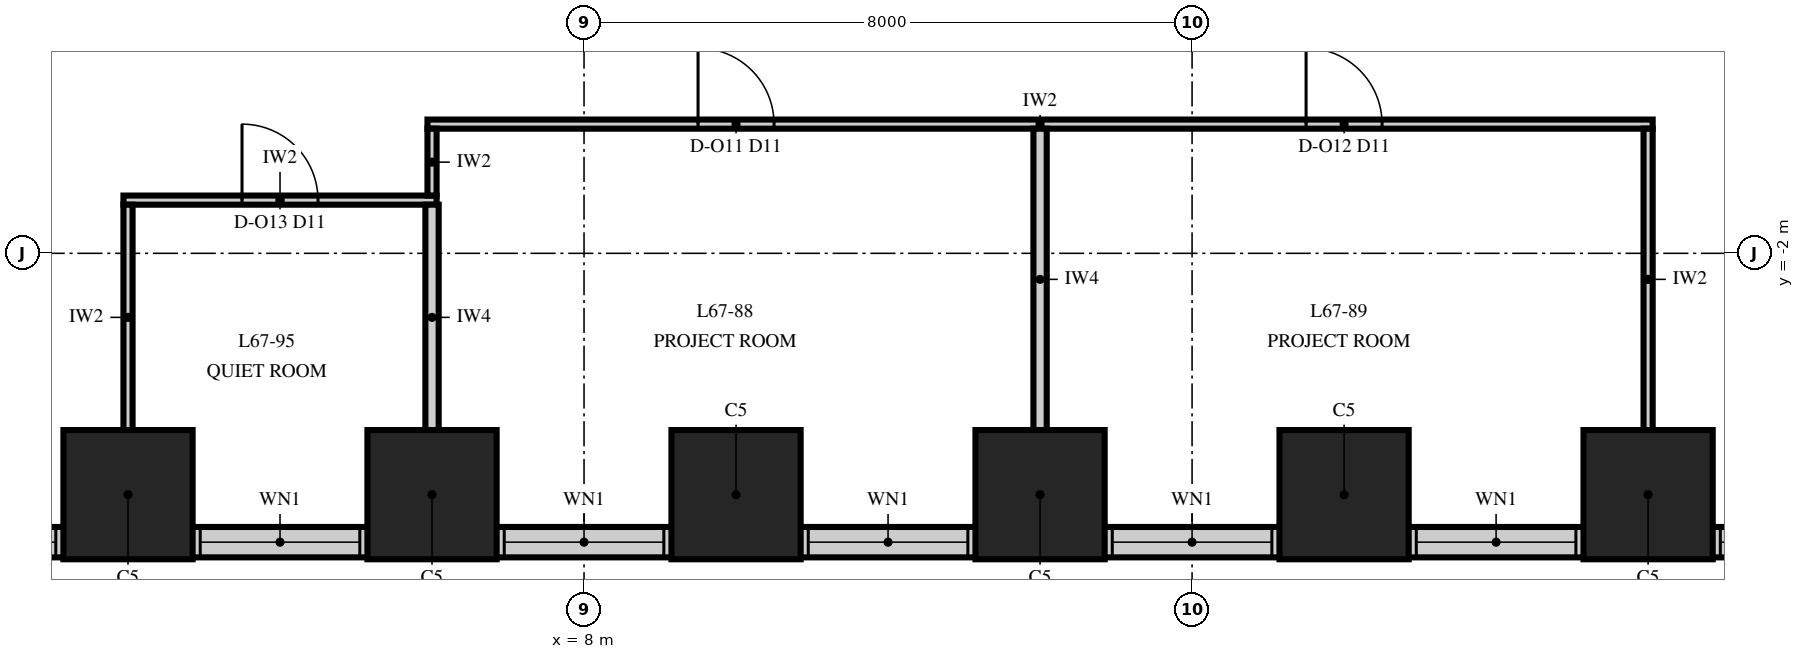
"""IFC4 building model, lengths in metres.
Left out: names, types, materials, properties, quantities, classifications, styles, units other than length and angle.
Written with IfcOpenShell. Run it as: python <this file> out.ifc"""

import sys

from ifc_helpers import new_model, si_unit, direction, frame, frame_2d, origin, origin_2d, place, context, subcontext, project, spatial, rectangle, extrude, element, fill, save


model = new_model("IFC4")
c1 = context("Model", 3, precision=1e-05, world=origin(), true_north=direction((0.0, 1.0)))
c2 = subcontext(c1, "Body", "Model", "MODEL_VIEW")
j1 = project(units=[si_unit("LENGTHUNIT", "METRE"), si_unit("PLANEANGLEUNIT", "RADIAN")], contexts=[c1])
p1 = place(None, origin())
s1 = spatial("IfcSite", under=j1, at=p1, CompositionType="ELEMENT")
p2 = place(p1, origin())
s2 = spatial("IfcBuilding", under=s1, at=p2, CompositionType="ELEMENT")
p3 = place(p2, frame((0.0, 0.0, 288.0)))
s3 = spatial("IfcBuildingStorey", under=s2, at=p3, CompositionType="ELEMENT", Elevation=288.0)
for number, where, z_axis, x_axis in (
    (1, (2.0, -5.175, 0.0), (0.0, 0.0, 1.0), (1.0, 0.0, 0.0)),
    (2, (6.0, -5.175, 0.0), (0.0, 0.0, 1.0), (1.0, 0.0, 0.0)),
    (3, (10.0, -5.175, 0.0), (0.0, 0.0, 1.0), (1.0, 0.0, 0.0)),
    (4, (14.0, -5.175, 0.0), (0.0, 0.0, 1.0), (1.0, 0.0, 0.0)),
    (5, (18.0, -5.175, 0.0), (0.0, 0.0, 1.0), (1.0, 0.0, 0.0)),
    (6, (22.0, -5.175, 0.0), (0.0, 0.0, 1.0), (1.0, 0.0, 0.0)),
):
    element("IfcColumn", number, at=place(p3, frame(where, z_axis=z_axis, x_axis=x_axis)), inside=s3, PredefinedType="COLUMN", context=c2, shape_type="SweptSolid", body=[
        extrude(rectangle(XDim=1.7, YDim=1.7, at=origin_2d()), origin(), (0.0, 0.0, 1.0), 4.0),
    ])
p4 = place(p3, frame((-26.0, -5.8, 0.0), z_axis=(0.0, 0.0, 1.0), x_axis=(1.0, 0.0, 0.0)))
e7 = element("IfcWall", 7, at=p4, inside=s3, PredefinedType="SOLIDWALL", context=c2, shape_type="SweptSolid", body=[
    extrude(rectangle(XDim=52.0, YDim=0.4, at=frame_2d((26.0, 0.0))), origin(), (0.0, 0.0, 1.0), 2.0),
])
p5 = place(p4, frame((0.95, 0.0, 0.8)))
e8 = element("IfcOpeningElement", 8, at=p5, cuts=e7, PredefinedType="OPENING", context=c2, shape_type="SweptSolid", body=[
    extrude(rectangle(XDim=2.1, YDim=1.15, at=frame_2d((1.05, 0.575))), frame((0.0, 0.215, 0.0), z_axis=(0.0, -1.0, 0.0), x_axis=(1.0, 0.0, 0.0)), (0.0, 0.0, 1.0), 0.43),
])
p6 = place(p4, frame((4.95, 0.0, 0.8)))
e9 = element("IfcOpeningElement", 9, at=p6, cuts=e7, PredefinedType="OPENING", context=c2, shape_type="SweptSolid", body=[
    extrude(rectangle(XDim=2.1, YDim=1.15, at=frame_2d((1.05, 0.575))), frame((0.0, 0.215, 0.0), z_axis=(0.0, -1.0, 0.0), x_axis=(1.0, 0.0, 0.0)), (0.0, 0.0, 1.0), 0.43),
])
p7 = place(p4, frame((8.95, 0.0, 0.8)))
e10 = element("IfcOpeningElement", 10, at=p7, cuts=e7, PredefinedType="OPENING", context=c2, shape_type="SweptSolid", body=[
    extrude(rectangle(XDim=2.1, YDim=1.15, at=frame_2d((1.05, 0.575))), frame((0.0, 0.215, 0.0), z_axis=(0.0, -1.0, 0.0), x_axis=(1.0, 0.0, 0.0)), (0.0, 0.0, 1.0), 0.43),
])
p8 = place(p4, frame((12.95, 0.0, 0.8)))
e11 = element("IfcOpeningElement", 11, at=p8, cuts=e7, PredefinedType="OPENING", context=c2, shape_type="SweptSolid", body=[
    extrude(rectangle(XDim=2.1, YDim=1.15, at=frame_2d((1.05, 0.575))), frame((0.0, 0.215, 0.0), z_axis=(0.0, -1.0, 0.0), x_axis=(1.0, 0.0, 0.0)), (0.0, 0.0, 1.0), 0.43),
])
p9 = place(p4, frame((16.95, 0.0, 0.8)))
e12 = element("IfcOpeningElement", 12, at=p9, cuts=e7, PredefinedType="OPENING", context=c2, shape_type="SweptSolid", body=[
    extrude(rectangle(XDim=2.1, YDim=1.15, at=frame_2d((1.05, 0.575))), frame((0.0, 0.215, 0.0), z_axis=(0.0, -1.0, 0.0), x_axis=(1.0, 0.0, 0.0)), (0.0, 0.0, 1.0), 0.43),
])
p10 = place(p4, frame((20.95, 0.0, 0.8)))
e13 = element("IfcOpeningElement", 13, at=p10, cuts=e7, PredefinedType="OPENING", context=c2, shape_type="SweptSolid", body=[
    extrude(rectangle(XDim=2.1, YDim=1.15, at=frame_2d((1.05, 0.575))), frame((0.0, 0.215, 0.0), z_axis=(0.0, -1.0, 0.0), x_axis=(1.0, 0.0, 0.0)), (0.0, 0.0, 1.0), 0.43),
])
p11 = place(p4, frame((24.95, 0.0, 0.8)))
e14 = element("IfcOpeningElement", 14, at=p11, cuts=e7, PredefinedType="OPENING", context=c2, shape_type="SweptSolid", body=[
    extrude(rectangle(XDim=2.1, YDim=1.15, at=frame_2d((1.05, 0.575))), frame((0.0, 0.215, 0.0), z_axis=(0.0, -1.0, 0.0), x_axis=(1.0, 0.0, 0.0)), (0.0, 0.0, 1.0), 0.43),
])
p12 = place(p4, frame((28.95, 0.0, 0.8)))
e15 = element("IfcOpeningElement", 15, at=p12, cuts=e7, PredefinedType="OPENING", context=c2, shape_type="SweptSolid", body=[
    extrude(rectangle(XDim=2.1, YDim=1.15, at=frame_2d((1.05, 0.575))), frame((0.0, 0.215, 0.0), z_axis=(0.0, -1.0, 0.0), x_axis=(1.0, 0.0, 0.0)), (0.0, 0.0, 1.0), 0.43),
])
p13 = place(p4, frame((32.95, 0.0, 0.8)))
e16 = element("IfcOpeningElement", 16, at=p13, cuts=e7, PredefinedType="OPENING", context=c2, shape_type="SweptSolid", body=[
    extrude(rectangle(XDim=2.1, YDim=1.15, at=frame_2d((1.05, 0.575))), frame((0.0, 0.215, 0.0), z_axis=(0.0, -1.0, 0.0), x_axis=(1.0, 0.0, 0.0)), (0.0, 0.0, 1.0), 0.43),
])
p14 = place(p4, frame((36.95, 0.0, 0.8)))
e17 = element("IfcOpeningElement", 17, at=p14, cuts=e7, PredefinedType="OPENING", context=c2, shape_type="SweptSolid", body=[
    extrude(rectangle(XDim=2.1, YDim=1.15, at=frame_2d((1.05, 0.575))), frame((0.0, 0.215, 0.0), z_axis=(0.0, -1.0, 0.0), x_axis=(1.0, 0.0, 0.0)), (0.0, 0.0, 1.0), 0.43),
])
p15 = place(p4, frame((40.95, 0.0, 0.8)))
e18 = element("IfcOpeningElement", 18, at=p15, cuts=e7, PredefinedType="OPENING", context=c2, shape_type="SweptSolid", body=[
    extrude(rectangle(XDim=2.1, YDim=1.15, at=frame_2d((1.05, 0.575))), frame((0.0, 0.215, 0.0), z_axis=(0.0, -1.0, 0.0), x_axis=(1.0, 0.0, 0.0)), (0.0, 0.0, 1.0), 0.43),
])
p16 = place(p4, frame((44.95, 0.0, 0.8)))
e19 = element("IfcOpeningElement", 19, at=p16, cuts=e7, PredefinedType="OPENING", context=c2, shape_type="SweptSolid", body=[
    extrude(rectangle(XDim=2.1, YDim=1.15, at=frame_2d((1.05, 0.575))), frame((0.0, 0.215, 0.0), z_axis=(0.0, -1.0, 0.0), x_axis=(1.0, 0.0, 0.0)), (0.0, 0.0, 1.0), 0.43),
])
p17 = place(p4, frame((48.95, 0.0, 0.8)))
e20 = element("IfcOpeningElement", 20, at=p17, cuts=e7, PredefinedType="OPENING", context=c2, shape_type="SweptSolid", body=[
    extrude(rectangle(XDim=2.1, YDim=1.15, at=frame_2d((1.05, 0.575))), frame((0.0, 0.215, 0.0), z_axis=(0.0, -1.0, 0.0), x_axis=(1.0, 0.0, 0.0)), (0.0, 0.0, 1.0), 0.43),
])
p18 = place(p3, frame((1.94, -1.3, 0.0), z_axis=(0.0, 0.0, 1.0), x_axis=(1.0, 0.0, 0.0)))
e21 = element("IfcWall", 21, at=p18, inside=s3, PredefinedType="PARTITIONING", context=c2, shape_type="SweptSolid", body=[
    extrude(rectangle(XDim=4.12, YDim=0.12, at=frame_2d((2.06, 0.0))), origin(), (0.0, 0.0, 1.0), 3.23),
])
p19 = place(p18, frame((1.56, 0.0, 0.0)))
e22 = element("IfcOpeningElement", 22, at=p19, cuts=e21, PredefinedType="OPENING", context=c2, shape_type="SweptSolid", body=[
    extrude(rectangle(XDim=1.0, YDim=2.4, at=frame_2d((0.5, 1.2))), frame((0.0, 0.075, 0.0), z_axis=(0.0, -1.0, 0.0), x_axis=(1.0, 0.0, 0.0)), (0.0, 0.0, 1.0), 0.15),
])
p20 = place(p3, frame((5.94, -0.3, 0.0), z_axis=(0.0, 0.0, 1.0), x_axis=(1.0, 0.0, 0.0)))
e23 = element("IfcWall", 23, at=p20, inside=s3, PredefinedType="PARTITIONING", context=c2, shape_type="SweptSolid", body=[
    extrude(rectangle(XDim=16.12, YDim=0.12, at=frame_2d((8.06, 0.0))), origin(), (0.0, 0.0, 1.0), 3.23),
])
p21 = place(p20, frame((3.56, 0.0, 0.0)))
e24 = element("IfcOpeningElement", 24, at=p21, cuts=e23, PredefinedType="OPENING", context=c2, shape_type="SweptSolid", body=[
    extrude(rectangle(XDim=1.0, YDim=2.4, at=frame_2d((0.5, 1.2))), frame((0.0, 0.075, 0.0), z_axis=(0.0, -1.0, 0.0), x_axis=(1.0, 0.0, 0.0)), (0.0, 0.0, 1.0), 0.15),
])
p22 = place(p20, frame((11.56, 0.0, 0.0)))
e25 = element("IfcOpeningElement", 25, at=p22, cuts=e23, PredefinedType="OPENING", context=c2, shape_type="SweptSolid", body=[
    extrude(rectangle(XDim=1.0, YDim=2.4, at=frame_2d((0.5, 1.2))), frame((0.0, 0.075, 0.0), z_axis=(0.0, -1.0, 0.0), x_axis=(1.0, 0.0, 0.0)), (0.0, 0.0, 1.0), 0.15),
])
p23 = place(p3, frame((2.0, -4.325, 0.0), z_axis=(0.0, 0.0, 1.0), x_axis=(0.0, 1.0, 0.0)))
e26 = element("IfcWall", 26, at=p23, inside=s3, PredefinedType="PARTITIONING", context=c2, shape_type="SweptSolid", body=[
    extrude(rectangle(XDim=2.965, YDim=0.12, at=frame_2d((1.482, 0.0))), origin(), (0.0, 0.0, 1.0), 3.23),
])
p24 = place(p3, frame((6.0, -4.325, 0.0), z_axis=(0.0, 0.0, 1.0), x_axis=(0.0, 1.0, 0.0)))
e27 = element("IfcWall", 27, at=p24, inside=s3, PredefinedType="PARTITIONING", context=c2, shape_type="SweptSolid", body=[
    extrude(rectangle(XDim=2.965, YDim=0.175, at=frame_2d((1.482, 0.0))), origin(), (0.0, 0.0, 1.0), 3.23),
])
p25 = place(p3, frame((6.0, -1.24, 0.0), z_axis=(0.0, 0.0, 1.0), x_axis=(0.0, 1.0, 0.0)))
e28 = element("IfcWall", 28, at=p25, inside=s3, PredefinedType="PARTITIONING", context=c2, shape_type="SweptSolid", body=[
    extrude(rectangle(XDim=0.88, YDim=0.12, at=frame_2d((0.44, 0.0))), origin(), (0.0, 0.0, 1.0), 3.23),
])
p26 = place(p3, frame((14.0, -4.325, 0.0), z_axis=(0.0, 0.0, 1.0), x_axis=(0.0, 1.0, 0.0)))
e29 = element("IfcWall", 29, at=p26, inside=s3, PredefinedType="PARTITIONING", context=c2, shape_type="SweptSolid", body=[
    extrude(rectangle(XDim=3.965, YDim=0.175, at=frame_2d((1.982, 0.0))), origin(), (0.0, 0.0, 1.0), 3.23),
])
p27 = place(p3, frame((22.0, -4.325, 0.0), z_axis=(0.0, 0.0, 1.0), x_axis=(0.0, 1.0, 0.0)))
e30 = element("IfcWall", 30, at=p27, inside=s3, PredefinedType="PARTITIONING", context=c2, shape_type="SweptSolid", body=[
    extrude(rectangle(XDim=3.965, YDim=0.12, at=frame_2d((1.982, 0.0))), origin(), (0.0, 0.0, 1.0), 3.23),
])
p28 = place(p11, origin())
e31 = element("IfcWindow", 31, at=p28, inside=s3, PartitioningType="SINGLE_PANEL", PredefinedType="WINDOW", context=c2, shape_type="SweptSolid", body=[
    extrude(rectangle(XDim=2.1, YDim=1.15, at=frame_2d((1.05, 0.575))), frame((0.0, 0.03, 0.0), z_axis=(0.0, -1.0, 0.0), x_axis=(1.0, 0.0, 0.0)), (0.0, 0.0, 1.0), 0.06),
])
fill(e14, e31)
p29 = place(p12, origin())
e32 = element("IfcWindow", 32, at=p29, inside=s3, PartitioningType="SINGLE_PANEL", PredefinedType="WINDOW", context=c2, shape_type="SweptSolid", body=[
    extrude(rectangle(XDim=2.1, YDim=1.15, at=frame_2d((1.05, 0.575))), frame((0.0, 0.03, 0.0), z_axis=(0.0, -1.0, 0.0), x_axis=(1.0, 0.0, 0.0)), (0.0, 0.0, 1.0), 0.06),
])
fill(e15, e32)
p30 = place(p13, origin())
e33 = element("IfcWindow", 33, at=p30, inside=s3, PartitioningType="SINGLE_PANEL", PredefinedType="WINDOW", context=c2, shape_type="SweptSolid", body=[
    extrude(rectangle(XDim=2.1, YDim=1.15, at=frame_2d((1.05, 0.575))), frame((0.0, 0.03, 0.0), z_axis=(0.0, -1.0, 0.0), x_axis=(1.0, 0.0, 0.0)), (0.0, 0.0, 1.0), 0.06),
])
fill(e16, e33)
p31 = place(p14, origin())
e34 = element("IfcWindow", 34, at=p31, inside=s3, PartitioningType="SINGLE_PANEL", PredefinedType="WINDOW", context=c2, shape_type="SweptSolid", body=[
    extrude(rectangle(XDim=2.1, YDim=1.15, at=frame_2d((1.05, 0.575))), frame((0.0, 0.03, 0.0), z_axis=(0.0, -1.0, 0.0), x_axis=(1.0, 0.0, 0.0)), (0.0, 0.0, 1.0), 0.06),
])
fill(e17, e34)
p32 = place(p15, origin())
e35 = element("IfcWindow", 35, at=p32, inside=s3, PartitioningType="SINGLE_PANEL", PredefinedType="WINDOW", context=c2, shape_type="SweptSolid", body=[
    extrude(rectangle(XDim=2.1, YDim=1.15, at=frame_2d((1.05, 0.575))), frame((0.0, 0.03, 0.0), z_axis=(0.0, -1.0, 0.0), x_axis=(1.0, 0.0, 0.0)), (0.0, 0.0, 1.0), 0.06),
])
fill(e18, e35)
p33 = place(p16, origin())
e36 = element("IfcWindow", 36, at=p33, inside=s3, PartitioningType="SINGLE_PANEL", PredefinedType="WINDOW", context=c2, shape_type="SweptSolid", body=[
    extrude(rectangle(XDim=2.1, YDim=1.15, at=frame_2d((1.05, 0.575))), frame((0.0, 0.03, 0.0), z_axis=(0.0, -1.0, 0.0), x_axis=(1.0, 0.0, 0.0)), (0.0, 0.0, 1.0), 0.06),
])
fill(e19, e36)
p34 = place(p17, origin())
e37 = element("IfcWindow", 37, at=p34, inside=s3, PartitioningType="SINGLE_PANEL", PredefinedType="WINDOW", context=c2, shape_type="SweptSolid", body=[
    extrude(rectangle(XDim=2.1, YDim=1.15, at=frame_2d((1.05, 0.575))), frame((0.0, 0.03, 0.0), z_axis=(0.0, -1.0, 0.0), x_axis=(1.0, 0.0, 0.0)), (0.0, 0.0, 1.0), 0.06),
])
fill(e20, e37)
p35 = place(p21, origin())
e38 = element("IfcDoor", 38, at=p35, inside=s3, OperationType="SINGLE_SWING_RIGHT", PredefinedType="DOOR", context=c2, shape_type="SweptSolid", body=[
    extrude(rectangle(XDim=1.0, YDim=2.4, at=frame_2d((0.5, 1.2))), frame((0.0, 0.06, 0.0), z_axis=(0.0, -1.0, 0.0), x_axis=(1.0, 0.0, 0.0)), (0.0, 0.0, 1.0), 0.12),
])
fill(e24, e38)
p36 = place(p22, origin())
e39 = element("IfcDoor", 39, at=p36, inside=s3, OperationType="SINGLE_SWING_RIGHT", PredefinedType="DOOR", context=c2, shape_type="SweptSolid", body=[
    extrude(rectangle(XDim=1.0, YDim=2.4, at=frame_2d((0.5, 1.2))), frame((0.0, 0.06, 0.0), z_axis=(0.0, -1.0, 0.0), x_axis=(1.0, 0.0, 0.0)), (0.0, 0.0, 1.0), 0.12),
])
fill(e25, e39)
p37 = place(p19, origin())
e40 = element("IfcDoor", 40, at=p37, inside=s3, OperationType="SINGLE_SWING_RIGHT", PredefinedType="DOOR", context=c2, shape_type="SweptSolid", body=[
    extrude(rectangle(XDim=1.0, YDim=2.4, at=frame_2d((0.5, 1.2))), frame((0.0, 0.06, 0.0), z_axis=(0.0, -1.0, 0.0), x_axis=(1.0, 0.0, 0.0)), (0.0, 0.0, 1.0), 0.12),
])
fill(e22, e40)
save(model, sys.argv[1])
